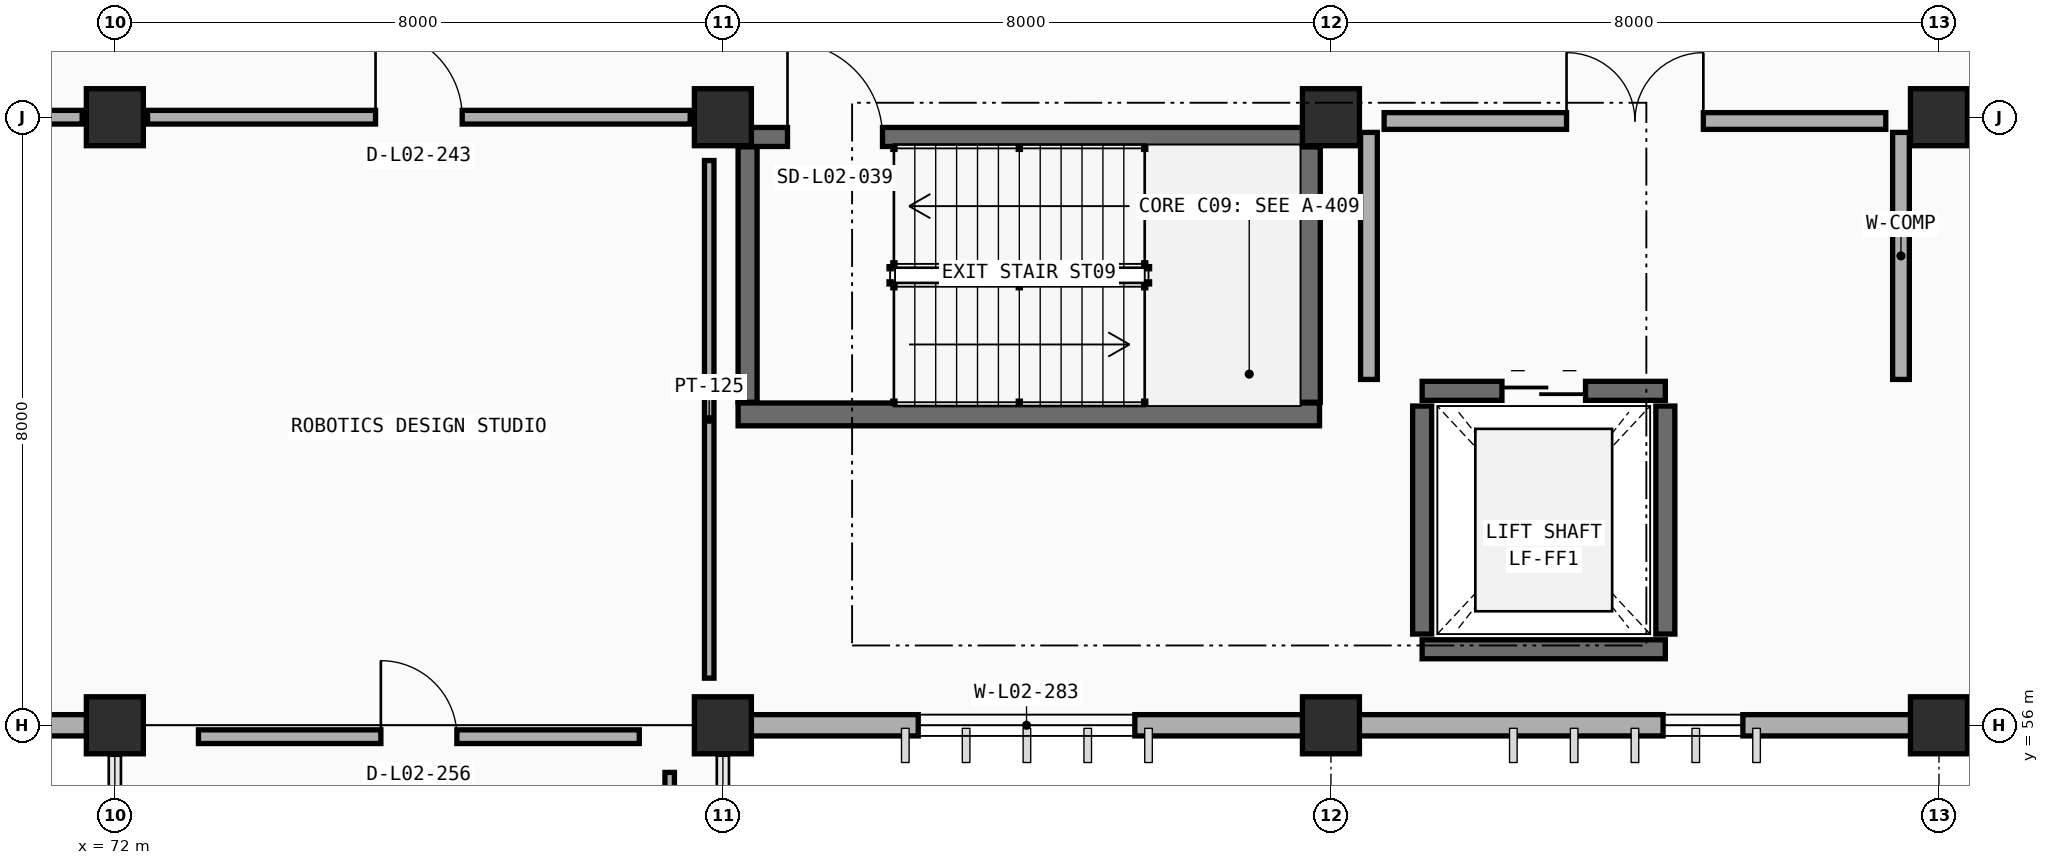
"""IFC4 building model, lengths in metres.
Left out: names, types, materials, properties, quantities, classifications, styles, units other than length and angle.
Written with IfcOpenShell. Run it as: python <this file> out.ifc"""

import sys

from ifc_helpers import new_model, si_unit, direction, frame, frame_2d, origin, origin_2d, place, context, subcontext, project, spatial, rectangle, extrude, element, fill, save


model = new_model("IFC4")
c1 = context("Model", 3, precision=1e-05, world=origin(), true_north=direction((0.0, 1.0)))
c2 = subcontext(c1, "Body", "Model", "MODEL_VIEW")
j1 = project(units=[si_unit("LENGTHUNIT", "METRE"), si_unit("PLANEANGLEUNIT", "RADIAN")], contexts=[c1])
p1 = place(None, origin())
s1 = spatial("IfcSite", under=j1, at=p1, CompositionType="ELEMENT")
p2 = place(p1, origin())
s2 = spatial("IfcBuilding", under=s1, at=p2, CompositionType="ELEMENT")
p3 = place(p2, frame((0.0, 0.0, 4.8)))
s3 = spatial("IfcBuildingStorey", under=s2, at=p3, CompositionType="ELEMENT", Elevation=4.8)
for number, where, z_axis, x_axis in (
    (1, (72.0, 56.0, 0.0), (0.0, 0.0, 1.0), (1.0, 0.0, 0.0)),
    (2, (80.0, 56.0, 0.0), (0.0, 0.0, 1.0), (1.0, 0.0, 0.0)),
    (3, (88.0, 56.0, 0.0), (0.0, 0.0, 1.0), (1.0, 0.0, 0.0)),
    (4, (96.0, 56.0, 0.0), (0.0, 0.0, 1.0), (1.0, 0.0, 0.0)),
    (5, (72.0, 64.0, 0.0), (0.0, 0.0, 1.0), (1.0, 0.0, 0.0)),
    (6, (80.0, 64.0, 0.0), (0.0, 0.0, 1.0), (1.0, 0.0, 0.0)),
    (7, (88.0, 64.0, 0.0), (0.0, 0.0, 1.0), (1.0, 0.0, 0.0)),
    (8, (96.0, 64.0, 0.0), (0.0, 0.0, 1.0), (1.0, 0.0, 0.0)),
):
    element("IfcColumn", number, at=place(p3, frame(where, z_axis=z_axis, x_axis=x_axis)), inside=s3, PredefinedType="COLUMN", context=c2, shape_type="SweptSolid", body=[
        extrude(rectangle(XDim=0.75, YDim=0.75, at=origin_2d()), origin(), (0.0, 0.0, 1.0), 4.8),
    ])
p4 = place(p3, frame((71.628, 56.0, 0.0), z_axis=(0.0, 0.0, 1.0), x_axis=(-1.0, 0.0, 0.0)))
e9 = element("IfcWall", 9, at=p4, inside=s3, PredefinedType="STANDARD", context=c2, shape_type="SweptSolid", body=[
    extrude(rectangle(XDim=7.281, YDim=0.28, at=frame_2d((3.641, 0.0))), origin(), (0.0, 0.0, 1.0), 3.91),
])
p5 = place(p4, frame((2.208, 0.0, 0.9)))
e10 = element("IfcOpeningElement", 10, at=p5, cuts=e9, PredefinedType="OPENING", context=c2, shape_type="SweptSolid", body=[
    extrude(rectangle(XDim=1.05, YDim=2.0, at=frame_2d((0.525, 1.0))), frame((0.0, 0.15, 0.0), z_axis=(0.0, -1.0, 0.0), x_axis=(1.0, 0.0, 0.0)), (0.0, 0.0, 1.0), 0.3),
])
p6 = place(p3, frame((87.628, 56.0, 0.0), z_axis=(0.0, 0.0, 1.0), x_axis=(-1.0, 0.0, 0.0)))
e11 = element("IfcWall", 11, at=p6, inside=s3, PredefinedType="STANDARD", context=c2, shape_type="SweptSolid", body=[
    extrude(rectangle(XDim=7.256, YDim=0.28, at=frame_2d((3.628, 0.0))), origin(), (0.0, 0.0, 1.0), 3.91),
])
p7 = place(p6, frame((2.208, 0.0, 0.9)))
e12 = element("IfcOpeningElement", 12, at=p7, cuts=e11, PredefinedType="OPENING", context=c2, shape_type="SweptSolid", body=[
    extrude(rectangle(XDim=2.85, YDim=1.85, at=frame_2d((1.425, 0.925))), frame((0.0, 0.15, 0.0), z_axis=(0.0, -1.0, 0.0), x_axis=(1.0, 0.0, 0.0)), (0.0, 0.0, 1.0), 0.3),
])
p8 = place(p3, frame((95.628, 56.0, 0.0), z_axis=(0.0, 0.0, 1.0), x_axis=(-1.0, 0.0, 0.0)))
e13 = element("IfcWall", 13, at=p8, inside=s3, PredefinedType="STANDARD", context=c2, shape_type="SweptSolid", body=[
    extrude(rectangle(XDim=7.256, YDim=0.28, at=frame_2d((3.628, 0.0))), origin(), (0.0, 0.0, 1.0), 3.91),
])
p9 = place(p8, frame((2.208, 0.0, 0.9)))
e14 = element("IfcOpeningElement", 14, at=p9, cuts=e13, PredefinedType="OPENING", context=c2, shape_type="SweptSolid", body=[
    extrude(rectangle(XDim=1.05, YDim=2.0, at=frame_2d((0.525, 1.0))), frame((0.0, 0.15, 0.0), z_axis=(0.0, -1.0, 0.0), x_axis=(1.0, 0.0, 0.0)), (0.0, 0.0, 1.0), 0.3),
])
p10 = place(p3, frame((103.628, 56.0, 0.0), z_axis=(0.0, 0.0, 1.0), x_axis=(-1.0, 0.0, 0.0)))
e15 = element("IfcWall", 15, at=p10, inside=s3, PredefinedType="STANDARD", context=c2, shape_type="SweptSolid", body=[
    extrude(rectangle(XDim=7.256, YDim=0.28, at=frame_2d((3.628, 0.0))), origin(), (0.0, 0.0, 1.0), 3.91),
])
p11 = place(p10, frame((2.208, 0.0, 0.9)))
e16 = element("IfcOpeningElement", 16, at=p11, cuts=e15, PredefinedType="OPENING", context=c2, shape_type="SweptSolid", body=[
    extrude(rectangle(XDim=1.25, YDim=2.0, at=frame_2d((0.625, 1.0))), frame((0.0, 0.15, 0.0), z_axis=(0.0, -1.0, 0.0), x_axis=(1.0, 0.0, 0.0)), (0.0, 0.0, 1.0), 0.3),
])
p12 = place(p3, frame((80.2, 60.09, 0.0), z_axis=(0.0, 0.0, 1.0), x_axis=(1.0, 0.0, 0.0)))
e17 = element("IfcWall", 17, at=p12, inside=s3, PredefinedType="SHEAR", context=c2, shape_type="SweptSolid", body=[
    extrude(rectangle(XDim=7.65, YDim=0.3, at=frame_2d((3.825, 0.0))), origin(), (0.0, 0.0, 1.0), 4.8),
])
p13 = place(p3, frame((87.71, 60.25, 0.0), z_axis=(0.0, 0.0, 1.0), x_axis=(0.0, 1.0, 0.0)))
e18 = element("IfcWall", 18, at=p13, inside=s3, PredefinedType="SHEAR", context=c2, shape_type="SweptSolid", body=[
    extrude(rectangle(XDim=3.36, YDim=0.3, at=frame_2d((1.68, 0.0))), origin(), (0.0, 0.0, 1.0), 4.8),
])
p14 = place(p3, frame((80.2, 63.74, 0.0), z_axis=(0.0, 0.0, 1.0), x_axis=(1.0, 0.0, 0.0)))
e19 = element("IfcWall", 19, at=p14, inside=s3, PredefinedType="SOLIDWALL", context=c2, shape_type="SweptSolid", body=[
    extrude(rectangle(XDim=7.65, YDim=0.25, at=frame_2d((3.825, 0.0))), origin(), (0.0, 0.0, 1.0), 4.8),
])
p15 = place(p14, frame((0.65, 0.0, 0.0)))
e20 = element("IfcOpeningElement", 20, at=p15, cuts=e19, PredefinedType="OPENING", context=c2, shape_type="SweptSolid", body=[
    extrude(rectangle(XDim=1.25, YDim=2.15, at=frame_2d((0.625, 1.075))), frame((0.0, 0.135, 0.0), z_axis=(0.0, -1.0, 0.0), x_axis=(1.0, 0.0, 0.0)), (0.0, 0.0, 1.0), 0.27),
])
p16 = place(p3, frame((80.325, 60.25, 0.0), z_axis=(0.0, 0.0, 1.0), x_axis=(0.0, 1.0, 0.0)))
e21 = element("IfcWall", 21, at=p16, inside=s3, PredefinedType="SOLIDWALL", context=c2, shape_type="SweptSolid", body=[
    extrude(rectangle(XDim=3.36, YDim=0.25, at=frame_2d((1.68, 0.0))), origin(), (0.0, 0.0, 1.0), 4.8),
])
p17 = place(p3, frame((89.2, 57.0, 0.0), z_axis=(0.0, 0.0, 1.0), x_axis=(1.0, 0.0, 0.0)))
e22 = element("IfcWall", 22, at=p17, inside=s3, PredefinedType="SOLIDWALL", context=c2, shape_type="SweptSolid", body=[
    extrude(rectangle(XDim=3.2, YDim=0.25, at=frame_2d((1.6, 0.0))), origin(), (0.0, 0.0, 1.0), 4.8),
])
p18 = place(p3, frame((89.2, 60.4, 0.0), z_axis=(0.0, 0.0, 1.0), x_axis=(1.0, 0.0, 0.0)))
e23 = element("IfcWall", 23, at=p18, inside=s3, PredefinedType="SOLIDWALL", context=c2, shape_type="SweptSolid", body=[
    extrude(rectangle(XDim=3.2, YDim=0.25, at=frame_2d((1.6, 0.0))), origin(), (0.0, 0.0, 1.0), 4.8),
])
p19 = place(p18, frame((1.05, 0.0, 0.0)))
e24 = element("IfcOpeningElement", 24, at=p19, cuts=e23, PredefinedType="OPENING", context=c2, shape_type="SweptSolid", body=[
    extrude(rectangle(XDim=1.1, YDim=2.15, at=frame_2d((0.55, 1.075))), frame((0.0, 0.135, 0.0), z_axis=(0.0, -1.0, 0.0), x_axis=(1.0, 0.0, 0.0)), (0.0, 0.0, 1.0), 0.27),
])
for number, where, z_axis, x_axis in (
    (25, (89.2, 57.2, 0.0), (0.0, 0.0, 1.0), (0.0, 1.0, 0.0)),
    (26, (92.4, 57.2, 0.0), (0.0, 0.0, 1.0), (0.0, 1.0, 0.0)),
):
    element("IfcWall", number, at=place(p3, frame(where, z_axis=z_axis, x_axis=x_axis)), inside=s3, PredefinedType="SOLIDWALL", context=c2, shape_type="SweptSolid", body=[
        extrude(rectangle(XDim=3.0, YDim=0.25, at=frame_2d((1.5, 0.0))), origin(), (0.0, 0.0, 1.0), 4.8),
    ])
p20 = place(p3, frame((88.7, 63.95, 0.0), z_axis=(0.0, 0.0, 1.0), x_axis=(1.0, 0.0, 0.0)))
e27 = element("IfcWall", 27, at=p20, inside=s3, PredefinedType="PARTITIONING", context=c2, shape_type="SweptSolid", body=[
    extrude(rectangle(XDim=6.6, YDim=0.22, at=frame_2d((3.3, 0.0))), origin(), (0.0, 0.0, 1.0), 3.86),
])
p21 = place(p20, frame((2.4, 0.0, 0.0)))
e28 = element("IfcOpeningElement", 28, at=p21, cuts=e27, PredefinedType="OPENING", context=c2, shape_type="SweptSolid", body=[
    extrude(rectangle(XDim=1.8, YDim=2.2, at=frame_2d((0.9, 1.1))), frame((0.0, 0.12, 0.0), z_axis=(0.0, -1.0, 0.0), x_axis=(1.0, 0.0, 0.0)), (0.0, 0.0, 1.0), 0.24),
])
for number, where, z_axis, x_axis in (
    (29, (88.5, 60.55, 0.0), (0.0, 0.0, 1.0), (0.0, 1.0, 0.0)),
    (30, (95.5, 60.55, 0.0), (0.0, 0.0, 1.0), (0.0, 1.0, 0.0)),
):
    element("IfcWall", number, at=place(p3, frame(where, z_axis=z_axis, x_axis=x_axis)), inside=s3, PredefinedType="PARTITIONING", context=c2, shape_type="SweptSolid", body=[
        extrude(rectangle(XDim=3.25, YDim=0.22, at=frame_2d((1.625, 0.0))), origin(), (0.0, 0.0, 1.0), 3.76),
    ])
p22 = place(p3, frame((56.43, 64.0, 0.0), z_axis=(0.0, 0.0, 1.0), x_axis=(1.0, 0.0, 0.0)))
e31 = element("IfcWall", 31, at=p22, inside=s3, PredefinedType="PARTITIONING", context=c2, shape_type="SweptSolid", body=[
    extrude(rectangle(XDim=15.14, YDim=0.18, at=frame_2d((7.57, 0.0))), origin(), (0.0, 0.0, 1.0), 3.86),
])
p23 = place(p22, frame((2.85, 0.0, 0.0)))
e32 = element("IfcOpeningElement", 32, at=p23, cuts=e31, PredefinedType="OPENING", context=c2, shape_type="SweptSolid", body=[
    extrude(rectangle(XDim=1.44, YDim=2.2, at=frame_2d((0.72, 1.1))), frame((0.0, 0.1, 0.0), z_axis=(0.0, -1.0, 0.0), x_axis=(1.0, 0.0, 0.0)), (0.0, 0.0, 1.0), 0.2),
])
p24 = place(p3, frame((72.43, 64.0, 0.0), z_axis=(0.0, 0.0, 1.0), x_axis=(1.0, 0.0, 0.0)))
e33 = element("IfcWall", 33, at=p24, inside=s3, PredefinedType="PARTITIONING", context=c2, shape_type="SweptSolid", body=[
    extrude(rectangle(XDim=7.14, YDim=0.18, at=frame_2d((3.57, 0.0))), origin(), (0.0, 0.0, 1.0), 3.86),
])
p25 = place(p24, frame((3.0, 0.0, 0.0)))
e34 = element("IfcOpeningElement", 34, at=p25, cuts=e33, PredefinedType="OPENING", context=c2, shape_type="SweptSolid", body=[
    extrude(rectangle(XDim=1.14, YDim=2.15, at=frame_2d((0.57, 1.075))), frame((0.0, 0.1, 0.0), z_axis=(0.0, -1.0, 0.0), x_axis=(1.0, 0.0, 0.0)), (0.0, 0.0, 1.0), 0.2),
])
p26 = place(p3, frame((79.82, 56.62, 0.0), z_axis=(0.0, 0.0, 1.0), x_axis=(0.0, 1.0, 0.0)))
e35 = element("IfcWall", 35, at=p26, inside=s3, PredefinedType="PARTITIONING", context=c2, shape_type="SweptSolid", body=[
    extrude(rectangle(XDim=6.81, YDim=0.125, at=frame_2d((3.405, 0.0))), origin(), (0.0, 0.0, 1.0), 3.76),
])
p27 = place(p3, frame((73.1, 55.85, 0.0), z_axis=(0.0, 0.0, 1.0), x_axis=(1.0, 0.0, 0.0)))
e36 = element("IfcWall", 36, at=p27, inside=s3, PredefinedType="PARTITIONING", context=c2, shape_type="SweptSolid", body=[
    extrude(rectangle(XDim=5.8, YDim=0.18, at=frame_2d((2.9, 0.0))), origin(), (0.0, 0.0, 1.0), 3.9),
])
p28 = place(p27, frame((2.4, 0.0, 0.0)))
e37 = element("IfcOpeningElement", 37, at=p28, cuts=e36, PredefinedType="OPENING", context=c2, shape_type="SweptSolid", body=[
    extrude(rectangle(XDim=1.0, YDim=2.15, at=frame_2d((0.5, 1.075))), frame((0.0, 0.1, 0.0), z_axis=(0.0, -1.0, 0.0), x_axis=(1.0, 0.0, 0.0)), (0.0, 0.0, 1.0), 0.2),
])
p29 = place(p3, frame((79.3, 50.47, 0.0), z_axis=(0.0, 0.0, 1.0), x_axis=(0.0, 1.0, 0.0)))
e38 = element("IfcWall", 38, at=p29, inside=s3, PredefinedType="PARTITIONING", context=c2, shape_type="SweptSolid", body=[
    extrude(rectangle(XDim=4.91, YDim=0.125, at=frame_2d((2.455, 0.0))), origin(), (0.0, 0.0, 1.0), 3.9),
])
p30 = place(p7, origin())
e39 = element("IfcWindow", 39, at=p30, inside=s3, PartitioningType="DOUBLE_PANEL_VERTICAL", PredefinedType="WINDOW", context=c2, shape_type="SweptSolid", body=[
    extrude(rectangle(XDim=2.85, YDim=1.85, at=frame_2d((1.425, 0.925))), frame((0.0, 0.03, 0.0), z_axis=(0.0, -1.0, 0.0), x_axis=(1.0, 0.0, 0.0)), (0.0, 0.0, 1.0), 0.06),
])
fill(e12, e39)
p31 = place(p9, origin())
e40 = element("IfcWindow", 40, at=p31, inside=s3, PartitioningType="SINGLE_PANEL", PredefinedType="WINDOW", context=c2, shape_type="SweptSolid", body=[
    extrude(rectangle(XDim=1.05, YDim=2.0, at=frame_2d((0.525, 1.0))), frame((0.0, 0.03, 0.0), z_axis=(0.0, -1.0, 0.0), x_axis=(1.0, 0.0, 0.0)), (0.0, 0.0, 1.0), 0.06),
])
fill(e14, e40)
p32 = place(p15, origin())
e41 = element("IfcDoor", 41, at=p32, inside=s3, OperationType="SINGLE_SWING_LEFT", PredefinedType="DOOR", context=c2, shape_type="SweptSolid", body=[
    extrude(rectangle(XDim=1.25, YDim=2.15, at=frame_2d((0.625, 1.075))), frame((0.0, 0.025, 0.0), z_axis=(0.0, -1.0, 0.0), x_axis=(1.0, 0.0, 0.0)), (0.0, 0.0, 1.0), 0.05),
])
fill(e20, e41)
p33 = place(p19, origin())
e42 = element("IfcDoor", 42, at=p33, inside=s3, OperationType="DOUBLE_DOOR_SLIDING", PredefinedType="DOOR", context=c2, shape_type="SweptSolid", body=[
    extrude(rectangle(XDim=1.1, YDim=2.15, at=frame_2d((0.55, 1.075))), frame((0.0, 0.025, 0.0), z_axis=(0.0, -1.0, 0.0), x_axis=(1.0, 0.0, 0.0)), (0.0, 0.0, 1.0), 0.05),
])
fill(e24, e42)
p34 = place(p21, origin())
e43 = element("IfcDoor", 43, at=p34, inside=s3, OperationType="DOUBLE_DOOR_SINGLE_SWING", PredefinedType="DOOR", context=c2, shape_type="SweptSolid", body=[
    extrude(rectangle(XDim=1.8, YDim=2.2, at=frame_2d((0.9, 1.1))), frame((0.0, 0.025, 0.0), z_axis=(0.0, -1.0, 0.0), x_axis=(1.0, 0.0, 0.0)), (0.0, 0.0, 1.0), 0.05),
])
fill(e28, e43)
p35 = place(p25, origin())
e44 = element("IfcDoor", 44, at=p35, inside=s3, OperationType="SINGLE_SWING_LEFT", PredefinedType="DOOR", context=c2, shape_type="SweptSolid", body=[
    extrude(rectangle(XDim=1.14, YDim=2.15, at=frame_2d((0.57, 1.075))), frame((0.0, 0.025, 0.0), z_axis=(0.0, -1.0, 0.0), x_axis=(1.0, 0.0, 0.0)), (0.0, 0.0, 1.0), 0.05),
])
fill(e34, e44)
p36 = place(p28, origin())
e45 = element("IfcDoor", 45, at=p36, inside=s3, OperationType="SINGLE_SWING_LEFT", PredefinedType="DOOR", context=c2, shape_type="SweptSolid", body=[
    extrude(rectangle(XDim=1.0, YDim=2.15, at=frame_2d((0.5, 1.075))), frame((0.0, 0.025, 0.0), z_axis=(0.0, -1.0, 0.0), x_axis=(1.0, 0.0, 0.0)), (0.0, 0.0, 1.0), 0.05),
])
fill(e37, e45)
save(model, sys.argv[1])
